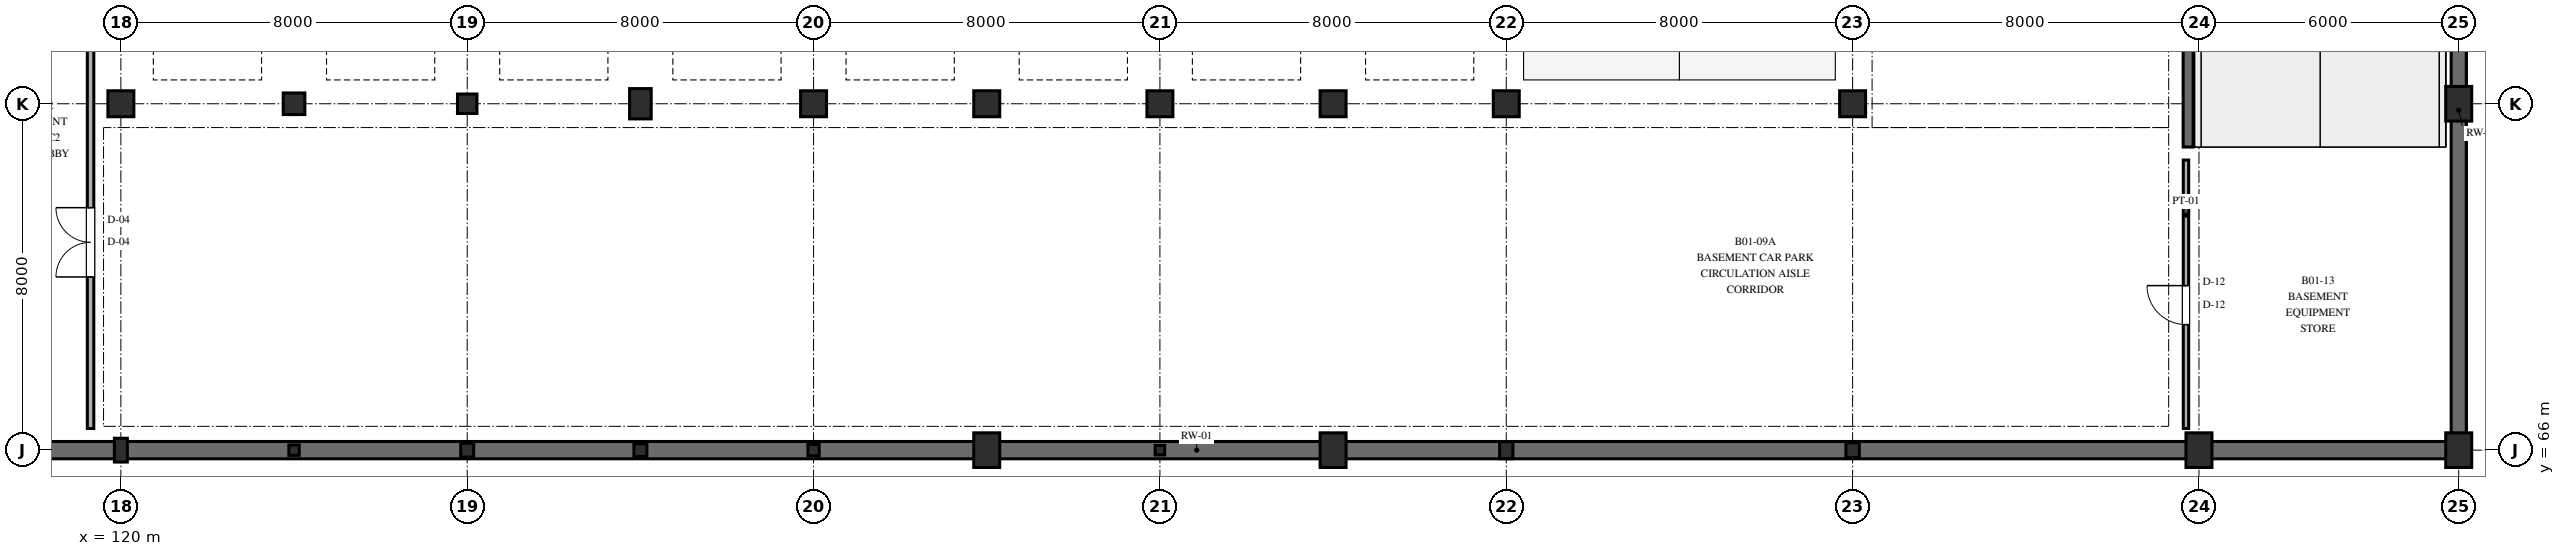
"""IFC4 building model, lengths in metres.
Left out: names, types, materials, properties, quantities, classifications, styles, units other than length and angle.
Written with IfcOpenShell. Run it as: python <this file> out.ifc"""

import sys

from ifc_helpers import new_model, si_unit, direction, frame, frame_2d, origin, origin_2d, place, context, subcontext, project, spatial, rectangle, i_section, extrude, element, fill, save


model = new_model("IFC4")
c1 = context("Model", 3, precision=1e-05, world=origin(), true_north=direction((0.0, 1.0)))
c2 = subcontext(c1, "Body", "Model", "MODEL_VIEW")
j1 = project(units=[si_unit("LENGTHUNIT", "METRE"), si_unit("PLANEANGLEUNIT", "RADIAN")], contexts=[c1])
p1 = place(None, origin())
s1 = spatial("IfcSite", under=j1, at=p1, CompositionType="ELEMENT")
p2 = place(p1, origin())
s2 = spatial("IfcBuilding", under=s1, at=p2, CompositionType="ELEMENT")
p3 = place(p2, frame((0.0, 0.0, -4.2)))
s3 = spatial("IfcBuildingStorey", under=s2, at=p3, CompositionType="ELEMENT", Elevation=-4.2)
p4 = place(p3, frame((120.0, 66.0, 0.0), z_axis=(0.0, 0.0, 1.0), x_axis=(1.0, 0.0, 0.0)))
e1 = element("IfcColumn", 1, at=p4, inside=s3, PredefinedType="COLUMN", context=c2, shape_type="SweptSolid", body=[
    extrude(i_section(OverallWidth=0.3, OverallDepth=0.55, WebThickness=0.015, FlangeThickness=0.029, FilletRadius=0.027, at=origin_2d()), origin(), (0.0, 0.0, 1.0), 4.2),
])
p5 = place(p3, frame((120.0, 74.0, 0.0), z_axis=(0.0, 0.0, 1.0), x_axis=(1.0, 0.0, 0.0)))
e2 = element("IfcColumn", 2, at=p5, inside=s3, PredefinedType="COLUMN", context=c2, shape_type="SweptSolid", body=[
    extrude(rectangle(XDim=0.6, YDim=0.6, at=origin_2d()), origin(), (0.0, 0.0, 1.0), 4.2),
])
p6 = place(p3, frame((124.0, 66.0, 0.0), z_axis=(0.0, 0.0, 1.0), x_axis=(1.0, 0.0, 0.0)))
e3 = element("IfcColumn", 3, at=p6, inside=s3, PredefinedType="COLUMN", context=c2, shape_type="SweptSolid", body=[
    extrude(i_section(OverallWidth=0.24, OverallDepth=0.24, WebThickness=0.01, FlangeThickness=0.017, FilletRadius=0.021, at=origin_2d()), origin(), (0.0, 0.0, 1.0), 4.2),
])
p7 = place(p3, frame((124.0, 74.0, 0.0), z_axis=(0.0, 0.0, 1.0), x_axis=(1.0, 0.0, 0.0)))
e4 = element("IfcColumn", 4, at=p7, inside=s3, PredefinedType="COLUMN", context=c2, shape_type="SweptSolid", body=[
    extrude(rectangle(XDim=0.5, YDim=0.5, at=origin_2d()), origin(), (0.0, 0.0, 1.0), 4.2),
])
p8 = place(p3, frame((128.0, 66.0, 0.0), z_axis=(0.0, 0.0, 1.0), x_axis=(1.0, 0.0, 0.0)))
e5 = element("IfcColumn", 5, at=p8, inside=s3, PredefinedType="COLUMN", context=c2, shape_type="SweptSolid", body=[
    extrude(i_section(OverallWidth=0.3, OverallDepth=0.32, WebThickness=0.011, FlangeThickness=0.021, FilletRadius=0.027, at=origin_2d()), origin(), (0.0, 0.0, 1.0), 4.2),
])
p9 = place(p3, frame((128.0, 74.0, 0.0), z_axis=(0.0, 0.0, 1.0), x_axis=(1.0, 0.0, 0.0)))
e6 = element("IfcColumn", 6, at=p9, inside=s3, PredefinedType="COLUMN", context=c2, shape_type="SweptSolid", body=[
    extrude(rectangle(XDim=0.45, YDim=0.45, at=origin_2d()), origin(), (0.0, 0.0, 1.0), 4.2),
])
p10 = place(p3, frame((132.0, 66.0, 0.0), z_axis=(0.0, 0.0, 1.0), x_axis=(1.0, 0.0, 0.0)))
e7 = element("IfcColumn", 7, at=p10, inside=s3, PredefinedType="COLUMN", context=c2, shape_type="SweptSolid", body=[
    extrude(i_section(OverallWidth=0.3, OverallDepth=0.29, WebThickness=0.009, FlangeThickness=0.014, FilletRadius=0.027, at=origin_2d()), origin(), (0.0, 0.0, 1.0), 4.2),
])
p11 = place(p3, frame((132.0, 74.0, 0.0), z_axis=(0.0, 0.0, 1.0), x_axis=(1.0, 0.0, 0.0)))
e8 = element("IfcColumn", 8, at=p11, inside=s3, PredefinedType="COLUMN", context=c2, shape_type="SweptSolid", body=[
    extrude(rectangle(XDim=0.5, YDim=0.7, at=origin_2d()), origin(), (0.0, 0.0, 1.0), 4.2),
])
p12 = place(p3, frame((136.0, 66.0, 0.0), z_axis=(0.0, 0.0, 1.0), x_axis=(1.0, 0.0, 0.0)))
e9 = element("IfcColumn", 9, at=p12, inside=s3, PredefinedType="COLUMN", context=c2, shape_type="SweptSolid", body=[
    extrude(i_section(OverallWidth=0.26, OverallDepth=0.26, WebThickness=0.01, FlangeThickness=0.018, FilletRadius=0.024, at=origin_2d()), origin(), (0.0, 0.0, 1.0), 4.2),
])
p13 = place(p3, frame((136.0, 74.0, 0.0), z_axis=(0.0, 0.0, 1.0), x_axis=(1.0, 0.0, 0.0)))
e10 = element("IfcColumn", 10, at=p13, inside=s3, PredefinedType="COLUMN", context=c2, shape_type="SweptSolid", body=[
    extrude(rectangle(XDim=0.6, YDim=0.6, at=origin_2d()), origin(), (0.0, 0.0, 1.0), 4.2),
])
p14 = place(p3, frame((140.0, 66.0, 0.0), z_axis=(0.0, 0.0, 1.0), x_axis=(1.0, 0.0, 0.0)))
e11 = element("IfcColumn", 11, at=p14, inside=s3, PredefinedType="COLUMN", context=c2, shape_type="SweptSolid", body=[
    extrude(rectangle(XDim=0.6, YDim=0.8, at=origin_2d()), origin(), (0.0, 0.0, 1.0), 4.2),
])
p15 = place(p3, frame((140.0, 74.0, 0.0), z_axis=(0.0, 0.0, 1.0), x_axis=(1.0, 0.0, 0.0)))
e12 = element("IfcColumn", 12, at=p15, inside=s3, PredefinedType="COLUMN", context=c2, shape_type="SweptSolid", body=[
    extrude(rectangle(XDim=0.6, YDim=0.6, at=origin_2d()), origin(), (0.0, 0.0, 1.0), 4.2),
])
p16 = place(p3, frame((144.0, 66.0, 0.0), z_axis=(0.0, 0.0, 1.0), x_axis=(1.0, 0.0, 0.0)))
e13 = element("IfcColumn", 13, at=p16, inside=s3, PredefinedType="COLUMN", context=c2, shape_type="SweptSolid", body=[
    extrude(i_section(OverallWidth=0.22, OverallDepth=0.22, WebThickness=0.01, FlangeThickness=0.016, FilletRadius=0.018, at=origin_2d()), origin(), (0.0, 0.0, 1.0), 4.2),
])
p17 = place(p3, frame((144.0, 74.0, 0.0), z_axis=(0.0, 0.0, 1.0), x_axis=(1.0, 0.0, 0.0)))
e14 = element("IfcColumn", 14, at=p17, inside=s3, PredefinedType="COLUMN", context=c2, shape_type="SweptSolid", body=[
    extrude(rectangle(XDim=0.6, YDim=0.6, at=origin_2d()), origin(), (0.0, 0.0, 1.0), 4.2),
])
p18 = place(p3, frame((148.0, 66.0, 0.0), z_axis=(0.0, 0.0, 1.0), x_axis=(1.0, 0.0, 0.0)))
e15 = element("IfcColumn", 15, at=p18, inside=s3, PredefinedType="COLUMN", context=c2, shape_type="SweptSolid", body=[
    extrude(rectangle(XDim=0.6, YDim=0.8, at=origin_2d()), origin(), (0.0, 0.0, 1.0), 4.2),
])
p19 = place(p3, frame((148.0, 74.0, 0.0), z_axis=(0.0, 0.0, 1.0), x_axis=(1.0, 0.0, 0.0)))
e16 = element("IfcColumn", 16, at=p19, inside=s3, PredefinedType="COLUMN", context=c2, shape_type="SweptSolid", body=[
    extrude(rectangle(XDim=0.6, YDim=0.6, at=origin_2d()), origin(), (0.0, 0.0, 1.0), 4.2),
])
p20 = place(p3, frame((152.0, 66.0, 0.0), z_axis=(0.0, 0.0, 1.0), x_axis=(1.0, 0.0, 0.0)))
e17 = element("IfcColumn", 17, at=p20, inside=s3, PredefinedType="COLUMN", context=c2, shape_type="SweptSolid", body=[
    extrude(i_section(OverallWidth=0.308, OverallDepth=0.395, WebThickness=0.021, FlangeThickness=0.04, FilletRadius=0.027, at=origin_2d()), origin(), (0.0, 0.0, 1.0), 4.2),
])
p21 = place(p3, frame((152.0, 74.0, 0.0), z_axis=(0.0, 0.0, 1.0), x_axis=(1.0, 0.0, 0.0)))
e18 = element("IfcColumn", 18, at=p21, inside=s3, PredefinedType="COLUMN", context=c2, shape_type="SweptSolid", body=[
    extrude(rectangle(XDim=0.6, YDim=0.6, at=origin_2d()), origin(), (0.0, 0.0, 1.0), 4.2),
])
p22 = place(p3, frame((160.0, 66.0, 0.0), z_axis=(0.0, 0.0, 1.0), x_axis=(1.0, 0.0, 0.0)))
e19 = element("IfcColumn", 19, at=p22, inside=s3, PredefinedType="COLUMN", context=c2, shape_type="SweptSolid", body=[
    extrude(i_section(OverallWidth=0.31, OverallDepth=0.34, WebThickness=0.021, FlangeThickness=0.039, FilletRadius=0.027, at=origin_2d()), origin(), (0.0, 0.0, 1.0), 4.2),
])
p23 = place(p3, frame((160.0, 74.0, 0.0), z_axis=(0.0, 0.0, 1.0), x_axis=(1.0, 0.0, 0.0)))
e20 = element("IfcColumn", 20, at=p23, inside=s3, PredefinedType="COLUMN", context=c2, shape_type="SweptSolid", body=[
    extrude(rectangle(XDim=0.6, YDim=0.6, at=origin_2d()), origin(), (0.0, 0.0, 1.0), 4.2),
])
for number, where, z_axis, x_axis in (
    (21, (168.0, 66.0, 0.0), (0.0, 0.0, 1.0), (1.0, 0.0, 0.0)),
    (22, (174.0, 66.0, 0.0), (0.0, 0.0, 1.0), (1.0, 0.0, 0.0)),
    (23, (174.0, 74.0, 0.0), (0.0, 0.0, 1.0), (1.0, 0.0, 0.0)),
):
    element("IfcColumn", number, at=place(p3, frame(where, z_axis=z_axis, x_axis=x_axis)), inside=s3, PredefinedType="COLUMN", context=c2, shape_type="SweptSolid", body=[
        extrude(rectangle(XDim=0.6, YDim=0.8, at=origin_2d()), origin(), (0.0, 0.0, 1.0), 4.2),
    ])
p24 = place(p3, frame((103.8, 66.0, 0.0), z_axis=(0.0, 0.0, 1.0), x_axis=(1.0, 0.0, 0.0)))
e24 = element("IfcWall", 24, at=p24, inside=s3, PredefinedType="SOLIDWALL", context=c2, shape_type="SweptSolid", body=[
    extrude(rectangle(XDim=70.4, YDim=0.4, at=frame_2d((35.2, 0.0))), origin(), (0.0, 0.0, 1.0), 3.93),
])
p25 = place(p3, frame((174.0, 66.2, 0.0), z_axis=(0.0, 0.0, 1.0), x_axis=(0.0, 1.0, 0.0)))
e25 = element("IfcWall", 25, at=p25, inside=s3, PredefinedType="SOLIDWALL", context=c2, shape_type="SweptSolid", body=[
    extrude(rectangle(XDim=50.6, YDim=0.35, at=frame_2d((25.3, 0.0))), origin(), (0.0, 0.0, 1.0), 3.93),
])
p26 = place(p3, frame((167.75, 73.0, 0.0), z_axis=(0.0, 0.0, 1.0), x_axis=(0.0, 1.0, 0.0)))
e26 = element("IfcWall", 26, at=p26, inside=s3, PredefinedType="SHEAR", context=c2, shape_type="SweptSolid", body=[
    extrude(rectangle(XDim=43.8, YDim=0.23, at=frame_2d((21.9, 0.0))), origin(), (0.0, 0.0, 1.0), 3.95),
])
p27 = place(p3, frame((119.3, 66.5, 0.0), z_axis=(0.0, 0.0, 1.0), x_axis=(0.0, 1.0, 0.0)))
e27 = element("IfcWall", 27, at=p27, inside=s3, PredefinedType="PARTITIONING", context=c2, shape_type="SweptSolid", body=[
    extrude(rectangle(XDim=41.1, YDim=0.15, at=frame_2d((20.55, 0.0))), origin(), (0.0, 0.0, 1.0), 3.25),
])
p28 = place(p27, frame((3.5, 0.0, 0.0)))
e28 = element("IfcOpeningElement", 28, at=p28, cuts=e27, PredefinedType="OPENING", context=c2, shape_type="SweptSolid", body=[
    extrude(rectangle(XDim=1.6, YDim=2.2, at=frame_2d((0.8, 1.1))), frame((0.0, 0.085, 0.0), z_axis=(0.0, -1.0, 0.0), x_axis=(1.0, 0.0, 0.0)), (0.0, 0.0, 1.0), 0.17),
])
p29 = place(p27, frame((24.2, 0.0, 0.0)))
e29 = element("IfcOpeningElement", 29, at=p29, cuts=e27, PredefinedType="OPENING", context=c2, shape_type="SweptSolid", body=[
    extrude(rectangle(XDim=1.6, YDim=2.2, at=frame_2d((0.8, 1.1))), frame((0.0, 0.085, 0.0), z_axis=(0.0, -1.0, 0.0), x_axis=(1.0, 0.0, 0.0)), (0.0, 0.0, 1.0), 0.17),
])
p30 = place(p3, frame((167.7, 66.5, 0.0), z_axis=(0.0, 0.0, 1.0), x_axis=(0.0, 1.0, 0.0)))
e30 = element("IfcWall", 30, at=p30, inside=s3, PredefinedType="PARTITIONING", context=c2, shape_type="SweptSolid", body=[
    extrude(rectangle(XDim=6.2, YDim=0.125, at=frame_2d((3.1, 0.0))), origin(), (0.0, 0.0, 1.0), 3.25),
])
p31 = place(p30, frame((2.4, 0.0, 0.0)))
e31 = element("IfcOpeningElement", 31, at=p31, cuts=e30, PredefinedType="OPENING", context=c2, shape_type="SweptSolid", body=[
    extrude(rectangle(XDim=0.9, YDim=2.1, at=frame_2d((0.45, 1.05))), frame((0.0, 0.073, 0.0), z_axis=(0.0, -1.0, 0.0), x_axis=(1.0, 0.0, 0.0)), (0.0, 0.0, 1.0), 0.145),
])
p32 = place(p28, origin())
e32 = element("IfcDoor", 32, at=p32, inside=s3, OperationType="DOUBLE_DOOR_SINGLE_SWING", PredefinedType="DOOR", context=c2, shape_type="SweptSolid", body=[
    extrude(rectangle(XDim=1.6, YDim=2.2, at=frame_2d((0.8, 1.1))), frame((0.0, 0.025, 0.0), z_axis=(0.0, -1.0, 0.0), x_axis=(1.0, 0.0, 0.0)), (0.0, 0.0, 1.0), 0.05),
])
fill(e28, e32)
p33 = place(p31, origin())
e33 = element("IfcDoor", 33, at=p33, inside=s3, OperationType="SINGLE_SWING_RIGHT", PredefinedType="DOOR", context=c2, shape_type="SweptSolid", body=[
    extrude(rectangle(XDim=0.9, YDim=2.1, at=frame_2d((0.45, 1.05))), frame((0.0, 0.025, 0.0), z_axis=(0.0, -1.0, 0.0), x_axis=(1.0, 0.0, 0.0)), (0.0, 0.0, 1.0), 0.05),
])
fill(e31, e33)
save(model, sys.argv[1])
